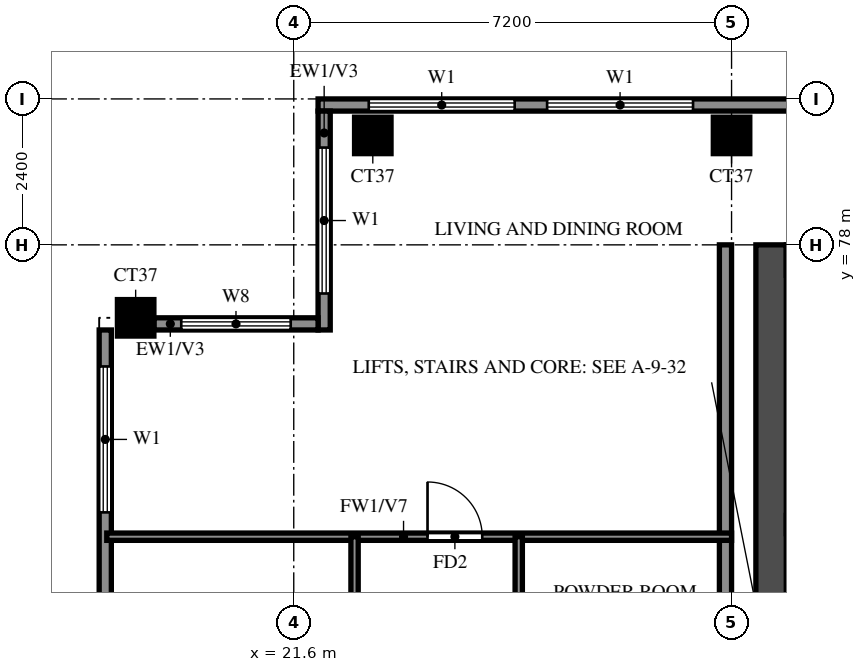
"""IFC4 building model, lengths in metres.
Left out: names, types, materials, properties, quantities, classifications, styles, units other than length and angle.
Written with IfcOpenShell. Run it as: python <this file> out.ifc"""

import sys

from ifc_helpers import new_model, si_unit, direction, frame, frame_2d, origin, origin_2d, place, context, subcontext, project, spatial, rectangle, extrude, source, transform, mapped, element, fill, save


model = new_model("IFC4")
c1 = context("Model", 3, precision=1e-05, world=origin(), true_north=direction((0.0, 1.0)))
c2 = subcontext(c1, "Body", "Model", "MODEL_VIEW")
j1 = project(units=[si_unit("LENGTHUNIT", "METRE"), si_unit("PLANEANGLEUNIT", "RADIAN")], contexts=[c1])
p1 = place(None, origin())
s1 = spatial("IfcSite", under=j1, at=p1, CompositionType="ELEMENT")
p2 = place(p1, origin())
s2 = spatial("IfcBuilding", under=s1, at=p2, CompositionType="ELEMENT")
p3 = place(p2, frame((0.0, 0.0, 260.5)))
s3 = spatial("IfcBuildingStorey", under=s2, at=p3, CompositionType="ELEMENT", Elevation=260.5)
m1 = source(origin(), c2, "Body", "SweptSolid", [
    extrude(rectangle(XDim=0.6, YDim=0.6, at=origin_2d()), origin(), (0.0, 0.0, 1.0), 3.22),
])
for number, where, z_axis, x_axis in (
    (1, (19.0, 76.8, 0.0), (0.0, 0.0, 1.0), (1.0, 0.0, 0.0)),
    (2, (22.9, 79.8, 0.0), (0.0, 0.0, 1.0), (1.0, 0.0, 0.0)),
    (3, (28.8, 79.8, 0.0), (0.0, 0.0, 1.0), (1.0, 0.0, 0.0)),
):
    element("IfcColumn", number, at=place(p3, frame(where, z_axis=z_axis, x_axis=x_axis)), inside=s3, PredefinedType="COLUMN", context=c2, shape_type="MappedRepresentation", body=[
        mapped(m1, transform((0.0, 0.0, 0.0))),
    ])
p4 = place(p3, frame((29.45, 66.15, 0.0), z_axis=(0.0, 0.0, 1.0), x_axis=(0.0, 1.0, 0.0)))
e4 = element("IfcWall", 4, at=p4, inside=s3, PredefinedType="SHEAR", context=c2, shape_type="SweptSolid", body=[
    extrude(rectangle(XDim=11.85, YDim=0.5, at=frame_2d((5.925, 0.0))), origin(), (0.0, 0.0, 1.0), 3.22),
])
p5 = place(p3, frame((78.6, 80.3, 0.0), z_axis=(0.0, 0.0, 1.0), x_axis=(-1.0, 0.0, 0.0)))
e5 = element("IfcWall", 5, at=p5, inside=s3, PredefinedType="SOLIDWALL", context=c2, shape_type="SweptSolid", body=[
    extrude(rectangle(XDim=56.6, YDim=0.2, at=frame_2d((28.3, 0.0))), origin(), (0.0, 0.0, 1.0), 3.22),
])
p6 = place(p5, frame((3.9, 0.0, 0.0)))
e6 = element("IfcOpeningElement", 6, at=p6, cuts=e5, PredefinedType="OPENING", context=c2, shape_type="SweptSolid", body=[
    extrude(rectangle(XDim=1.8, YDim=2.4, at=frame_2d((0.9, 1.2))), frame((0.0, 0.11, 0.0), z_axis=(0.0, -1.0, 0.0), x_axis=(1.0, 0.0, 0.0)), (0.0, 0.0, 1.0), 0.22),
])
p7 = place(p5, frame((50.433, 0.0, 0.6)))
e7 = element("IfcOpeningElement", 7, at=p7, cuts=e5, PredefinedType="OPENING", context=c2, shape_type="SweptSolid", body=[
    extrude(rectangle(XDim=2.4, YDim=2.4, at=frame_2d((1.2, 1.2))), frame((0.0, 0.11, 0.0), z_axis=(0.0, -1.0, 0.0), x_axis=(1.0, 0.0, 0.0)), (0.0, 0.0, 1.0), 0.22),
])
p8 = place(p5, frame((53.367, 0.0, 0.6)))
e8 = element("IfcOpeningElement", 8, at=p8, cuts=e5, PredefinedType="OPENING", context=c2, shape_type="SweptSolid", body=[
    extrude(rectangle(XDim=2.4, YDim=2.4, at=frame_2d((1.2, 1.2))), frame((0.0, 0.11, 0.0), z_axis=(0.0, -1.0, 0.0), x_axis=(1.0, 0.0, 0.0)), (0.0, 0.0, 1.0), 0.22),
])
p9 = place(p5, frame((0.4, 0.0, 0.6)))
e9 = element("IfcOpeningElement", 9, at=p9, cuts=e5, PredefinedType="OPENING", context=c2, shape_type="SweptSolid", body=[
    extrude(rectangle(XDim=1.2, YDim=2.4, at=frame_2d((0.6, 1.2))), frame((0.0, 0.11, 0.0), z_axis=(0.0, -1.0, 0.0), x_axis=(1.0, 0.0, 0.0)), (0.0, 0.0, 1.0), 0.22),
])
p10 = place(p5, frame((2.55, 0.0, 0.6)))
e10 = element("IfcOpeningElement", 10, at=p10, cuts=e5, PredefinedType="OPENING", context=c2, shape_type="SweptSolid", body=[
    extrude(rectangle(XDim=0.9, YDim=2.4, at=frame_2d((0.45, 1.2))), frame((0.0, 0.11, 0.0), z_axis=(0.0, -1.0, 0.0), x_axis=(1.0, 0.0, 0.0)), (0.0, 0.0, 1.0), 0.22),
])
p11 = place(p3, frame((22.1, 80.2, 0.0), z_axis=(0.0, 0.0, 1.0), x_axis=(0.0, -1.0, 0.0)))
e11 = element("IfcWall", 11, at=p11, inside=s3, PredefinedType="SOLIDWALL", context=c2, shape_type="SweptSolid", body=[
    extrude(rectangle(XDim=3.6, YDim=0.2, at=frame_2d((1.8, 0.0))), origin(), (0.0, 0.0, 1.0), 3.22),
])
p12 = place(p11, frame((0.6, 0.0, 0.6)))
e12 = element("IfcOpeningElement", 12, at=p12, cuts=e11, PredefinedType="OPENING", context=c2, shape_type="SweptSolid", body=[
    extrude(rectangle(XDim=2.4, YDim=2.4, at=frame_2d((1.2, 1.2))), frame((0.0, 0.11, 0.0), z_axis=(0.0, -1.0, 0.0), x_axis=(1.0, 0.0, 0.0)), (0.0, 0.0, 1.0), 0.22),
])
p13 = place(p3, frame((22.0, 76.7, 0.0), z_axis=(0.0, 0.0, 1.0), x_axis=(-1.0, 0.0, 0.0)))
e13 = element("IfcWall", 13, at=p13, inside=s3, PredefinedType="SOLIDWALL", context=c2, shape_type="SweptSolid", body=[
    extrude(rectangle(XDim=2.7, YDim=0.2, at=frame_2d((1.35, 0.0))), origin(), (0.0, 0.0, 1.0), 3.22),
])
p14 = place(p13, frame((0.45, 0.0, 0.6)))
e14 = element("IfcOpeningElement", 14, at=p14, cuts=e13, PredefinedType="OPENING", context=c2, shape_type="SweptSolid", body=[
    extrude(rectangle(XDim=1.8, YDim=2.4, at=frame_2d((0.9, 1.2))), frame((0.0, 0.11, 0.0), z_axis=(0.0, -1.0, 0.0), x_axis=(1.0, 0.0, 0.0)), (0.0, 0.0, 1.0), 0.22),
])
p15 = place(p3, frame((18.5, 76.6, 0.0), z_axis=(0.0, 0.0, 1.0), x_axis=(0.0, -1.0, 0.0)))
e15 = element("IfcWall", 15, at=p15, inside=s3, PredefinedType="SOLIDWALL", context=c2, shape_type="SweptSolid", body=[
    extrude(rectangle(XDim=14.2, YDim=0.2, at=frame_2d((7.1, 0.0))), origin(), (0.0, 0.0, 1.0), 3.22),
])
p16 = place(p15, frame((7.767, 0.0, 0.6)))
e16 = element("IfcOpeningElement", 16, at=p16, cuts=e15, PredefinedType="OPENING", context=c2, shape_type="SweptSolid", body=[
    extrude(rectangle(XDim=2.4, YDim=2.4, at=frame_2d((1.2, 1.2))), frame((0.0, 0.11, 0.0), z_axis=(0.0, -1.0, 0.0), x_axis=(1.0, 0.0, 0.0)), (0.0, 0.0, 1.0), 0.22),
])
p17 = place(p15, frame((10.833, 0.0, 0.6)))
e17 = element("IfcOpeningElement", 17, at=p17, cuts=e15, PredefinedType="OPENING", context=c2, shape_type="SweptSolid", body=[
    extrude(rectangle(XDim=2.4, YDim=2.4, at=frame_2d((1.2, 1.2))), frame((0.0, 0.11, 0.0), z_axis=(0.0, -1.0, 0.0), x_axis=(1.0, 0.0, 0.0)), (0.0, 0.0, 1.0), 0.22),
])
p18 = place(p15, frame((4.75, 0.0, 1.5)))
e18 = element("IfcOpeningElement", 18, at=p18, cuts=e15, PredefinedType="OPENING", context=c2, shape_type="SweptSolid", body=[
    extrude(rectangle(XDim=0.9, YDim=0.9, at=frame_2d((0.45, 0.45))), frame((0.0, 0.11, 0.0), z_axis=(0.0, -1.0, 0.0), x_axis=(1.0, 0.0, 0.0)), (0.0, 0.0, 1.0), 0.22),
])
p19 = place(p15, frame((0.6, 0.0, 0.6)))
e19 = element("IfcOpeningElement", 19, at=p19, cuts=e15, PredefinedType="OPENING", context=c2, shape_type="SweptSolid", body=[
    extrude(rectangle(XDim=2.4, YDim=2.4, at=frame_2d((1.2, 1.2))), frame((0.0, 0.11, 0.0), z_axis=(0.0, -1.0, 0.0), x_axis=(1.0, 0.0, 0.0)), (0.0, 0.0, 1.0), 0.22),
])
p20 = place(p3, frame((28.7, 62.4, 0.0), z_axis=(0.0, 0.0, 1.0), x_axis=(0.0, 1.0, 0.0)))
e20 = element("IfcWall", 20, at=p20, inside=s3, PredefinedType="SOLIDWALL", context=c2, shape_type="SweptSolid", body=[
    extrude(rectangle(XDim=15.6, YDim=0.2, at=frame_2d((7.8, 0.0))), origin(), (0.0, 0.0, 1.0), 3.22),
])
p21 = place(p3, frame((18.525, 73.2, 0.0), z_axis=(0.0, 0.0, 1.0), x_axis=(1.0, 0.0, 0.0)))
e21 = element("IfcWall", 21, at=p21, inside=s3, PredefinedType="PARTITIONING", context=c2, shape_type="SweptSolid", body=[
    extrude(rectangle(XDim=10.275, YDim=0.12, at=frame_2d((5.138, 0.0))), origin(), (0.0, 0.0, 1.0), 2.32),
])
p22 = place(p21, frame((5.275, 0.0, 0.0)))
e22 = element("IfcOpeningElement", 22, at=p22, cuts=e21, PredefinedType="OPENING", context=c2, shape_type="SweptSolid", body=[
    extrude(rectangle(XDim=0.9, YDim=2.1, at=frame_2d((0.45, 1.05))), frame((0.0, 0.07, 0.0), z_axis=(0.0, -1.0, 0.0), x_axis=(1.0, 0.0, 0.0)), (0.0, 0.0, 1.0), 0.14),
])
p23 = place(p3, frame((22.6, 69.6, 0.0), z_axis=(0.0, 0.0, 1.0), x_axis=(0.0, 1.0, 0.0)))
e23 = element("IfcWall", 23, at=p23, inside=s3, PredefinedType="PARTITIONING", context=c2, shape_type="SweptSolid", body=[
    extrude(rectangle(XDim=3.6, YDim=0.12, at=frame_2d((1.8, 0.0))), origin(), (0.0, 0.0, 1.0), 3.22),
])
p24 = place(p3, frame((25.3, 61.2, 0.0), z_axis=(0.0, 0.0, 1.0), x_axis=(0.0, 1.0, 0.0)))
e24 = element("IfcWall", 24, at=p24, inside=s3, PredefinedType="PARTITIONING", context=c2, shape_type="SweptSolid", body=[
    extrude(rectangle(XDim=12.0, YDim=0.12, at=frame_2d((6.0, 0.0))), origin(), (0.0, 0.0, 1.0), 3.22),
])
p25 = place(p24, frame((5.3, 0.0, 0.0)))
e25 = element("IfcOpeningElement", 25, at=p25, cuts=e24, PredefinedType="OPENING", context=c2, shape_type="SweptSolid", body=[
    extrude(rectangle(XDim=0.9, YDim=2.1, at=frame_2d((0.45, 1.05))), frame((0.0, 0.07, 0.0), z_axis=(0.0, -1.0, 0.0), x_axis=(1.0, 0.0, 0.0)), (0.0, 0.0, 1.0), 0.14),
])
p26 = place(p24, frame((9.7, 0.0, 0.0)))
e26 = element("IfcOpeningElement", 26, at=p26, cuts=e24, PredefinedType="OPENING", context=c2, shape_type="SweptSolid", body=[
    extrude(rectangle(XDim=0.8, YDim=2.1, at=frame_2d((0.4, 1.05))), frame((0.0, 0.07, 0.0), z_axis=(0.0, -1.0, 0.0), x_axis=(1.0, 0.0, 0.0)), (0.0, 0.0, 1.0), 0.14),
])
p27 = place(p7, origin())
e27 = element("IfcWindow", 27, at=p27, inside=s3, PartitioningType="DOUBLE_PANEL_VERTICAL", PredefinedType="WINDOW", context=c2, shape_type="SweptSolid", body=[
    extrude(rectangle(XDim=2.4, YDim=2.4, at=frame_2d((1.2, 1.2))), frame((0.0, 0.03, 0.0), z_axis=(0.0, -1.0, 0.0), x_axis=(1.0, 0.0, 0.0)), (0.0, 0.0, 1.0), 0.06),
])
fill(e7, e27)
p28 = place(p8, origin())
e28 = element("IfcWindow", 28, at=p28, inside=s3, PartitioningType="DOUBLE_PANEL_VERTICAL", PredefinedType="WINDOW", context=c2, shape_type="SweptSolid", body=[
    extrude(rectangle(XDim=2.4, YDim=2.4, at=frame_2d((1.2, 1.2))), frame((0.0, 0.03, 0.0), z_axis=(0.0, -1.0, 0.0), x_axis=(1.0, 0.0, 0.0)), (0.0, 0.0, 1.0), 0.06),
])
fill(e8, e28)
p29 = place(p12, origin())
e29 = element("IfcWindow", 29, at=p29, inside=s3, PartitioningType="DOUBLE_PANEL_VERTICAL", PredefinedType="WINDOW", context=c2, shape_type="SweptSolid", body=[
    extrude(rectangle(XDim=2.4, YDim=2.4, at=frame_2d((1.2, 1.2))), frame((0.0, 0.03, 0.0), z_axis=(0.0, -1.0, 0.0), x_axis=(1.0, 0.0, 0.0)), (0.0, 0.0, 1.0), 0.06),
])
fill(e12, e29)
p30 = place(p14, origin())
e30 = element("IfcWindow", 30, at=p30, inside=s3, PartitioningType="DOUBLE_PANEL_VERTICAL", PredefinedType="WINDOW", context=c2, shape_type="SweptSolid", body=[
    extrude(rectangle(XDim=1.8, YDim=2.4, at=frame_2d((0.9, 1.2))), frame((0.0, 0.03, 0.0), z_axis=(0.0, -1.0, 0.0), x_axis=(1.0, 0.0, 0.0)), (0.0, 0.0, 1.0), 0.06),
])
fill(e14, e30)
p31 = place(p19, origin())
e31 = element("IfcWindow", 31, at=p31, inside=s3, PartitioningType="DOUBLE_PANEL_VERTICAL", PredefinedType="WINDOW", context=c2, shape_type="SweptSolid", body=[
    extrude(rectangle(XDim=2.4, YDim=2.4, at=frame_2d((1.2, 1.2))), frame((0.0, 0.03, 0.0), z_axis=(0.0, -1.0, 0.0), x_axis=(1.0, 0.0, 0.0)), (0.0, 0.0, 1.0), 0.06),
])
fill(e19, e31)
p32 = place(p22, origin())
e32 = element("IfcDoor", 32, at=p32, inside=s3, OperationType="SINGLE_SWING_LEFT", PredefinedType="DOOR", context=c2, shape_type="SweptSolid", body=[
    extrude(rectangle(XDim=0.9, YDim=2.1, at=frame_2d((0.45, 1.05))), frame((0.0, 0.025, 0.0), z_axis=(0.0, -1.0, 0.0), x_axis=(1.0, 0.0, 0.0)), (0.0, 0.0, 1.0), 0.05),
])
fill(e22, e32)
save(model, sys.argv[1])
